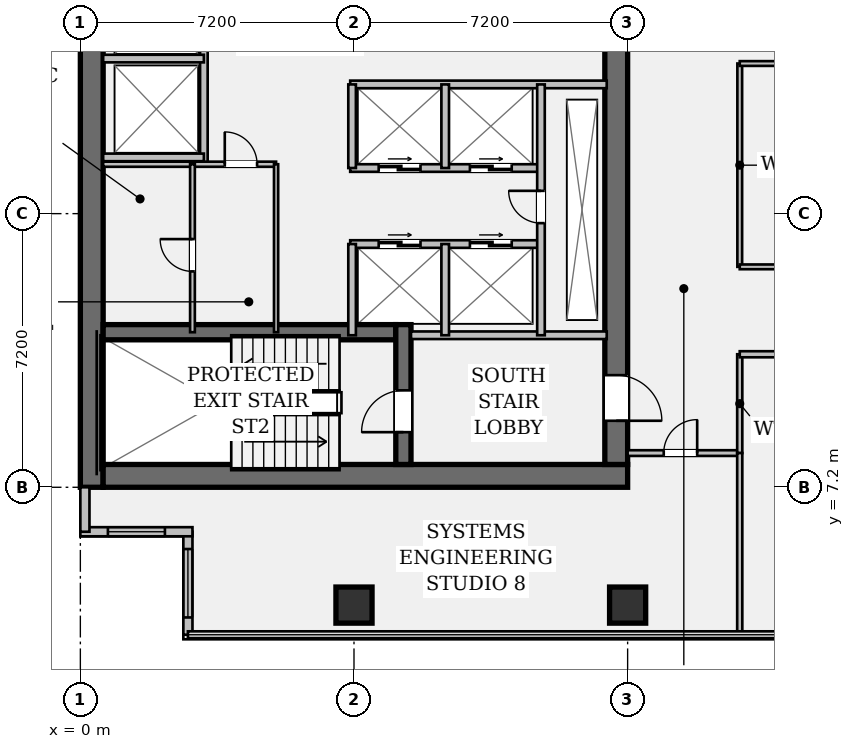
"""IFC4 building model, lengths in metres.
Left out: names, types, materials, properties, quantities, classifications, styles, units other than length and angle.
Written with IfcOpenShell. Run it as: python <this file> out.ifc"""

import sys

from ifc_helpers import new_model, si_unit, direction, frame, frame_2d, origin, origin_2d, place, context, subcontext, project, spatial, rectangle, hollow_rectangle, extrude, element, fill, save


model = new_model("IFC4")
c1 = context("Model", 3, precision=1e-05, world=origin(), true_north=direction((0.0, 1.0)))
c2 = subcontext(c1, "Body", "Model", "MODEL_VIEW")
j1 = project(units=[si_unit("LENGTHUNIT", "METRE"), si_unit("PLANEANGLEUNIT", "RADIAN")], contexts=[c1])
p1 = place(None, origin())
s1 = spatial("IfcSite", under=j1, at=p1, CompositionType="ELEMENT")
p2 = place(p1, origin())
s2 = spatial("IfcBuilding", under=s1, at=p2, CompositionType="ELEMENT")
p3 = place(p2, frame((0.0, 0.0, 106.05)))
s3 = spatial("IfcBuildingStorey", under=s2, at=p3, CompositionType="ELEMENT", Elevation=106.05)
p4 = place(p3, frame((0.3, 7.2, 0.0), z_axis=(0.0, 0.0, 1.0), x_axis=(0.0, 1.0, 0.0)))
e1 = element("IfcWall", 1, at=p4, inside=s3, PredefinedType="SHEAR", context=c2, shape_type="SweptSolid", body=[
    extrude(rectangle(XDim=28.8, YDim=0.6, at=frame_2d((14.4, 0.0))), origin(), (0.0, 0.0, 1.0), 3.58),
])
p5 = place(p3, frame((0.6, 7.5, 0.0), z_axis=(0.0, 0.0, 1.0), x_axis=(1.0, 0.0, 0.0)))
e2 = element("IfcWall", 2, at=p5, inside=s3, PredefinedType="SHEAR", context=c2, shape_type="SweptSolid", body=[
    extrude(rectangle(XDim=13.8, YDim=0.6, at=frame_2d((6.9, 0.0))), origin(), (0.0, 0.0, 1.0), 3.58),
])
p6 = place(p3, frame((14.1, 35.4, 0.0), z_axis=(0.0, 0.0, 1.0), x_axis=(0.0, -1.0, 0.0)))
e3 = element("IfcWall", 3, at=p6, inside=s3, PredefinedType="SHEAR", context=c2, shape_type="SweptSolid", body=[
    extrude(rectangle(XDim=27.6, YDim=0.6, at=frame_2d((13.8, 0.0))), origin(), (0.0, 0.0, 1.0), 3.58),
])
p7 = place(p6, frame((1.3, 0.0, 0.0)))
e4 = element("IfcOpeningElement", 4, at=p7, cuts=e3, PredefinedType="OPENING", context=c2, shape_type="SweptSolid", body=[
    extrude(rectangle(XDim=1.2, YDim=2.15, at=frame_2d((0.6, 1.075))), frame((0.0, 0.312, 0.0), z_axis=(0.0, -1.0, 0.0), x_axis=(1.0, 0.0, 0.0)), (0.0, 0.0, 1.0), 0.624),
])
p8 = place(p6, frame((25.25, 0.0, 0.0)))
e5 = element("IfcOpeningElement", 5, at=p8, cuts=e3, PredefinedType="OPENING", context=c2, shape_type="SweptSolid", body=[
    extrude(rectangle(XDim=1.2, YDim=2.15, at=frame_2d((0.6, 1.075))), frame((0.0, 0.312, 0.0), z_axis=(0.0, -1.0, 0.0), x_axis=(1.0, 0.0, 0.0)), (0.0, 0.0, 1.0), 0.624),
])
p9 = place(p6, frame((14.6, 0.0, 0.0)))
e6 = element("IfcOpeningElement", 6, at=p9, cuts=e3, PredefinedType="OPENING", context=c2, shape_type="SweptSolid", body=[
    extrude(rectangle(XDim=1.6, YDim=2.2, at=frame_2d((0.8, 1.1))), frame((0.0, 0.312, 0.0), z_axis=(0.0, -1.0, 0.0), x_axis=(1.0, 0.0, 0.0)), (0.0, 0.0, 1.0), 0.624),
])
p10 = place(p3, frame((0.6, 11.28, 0.0), z_axis=(0.0, 0.0, 1.0), x_axis=(1.0, 0.0, 0.0)))
e7 = element("IfcWall", 7, at=p10, inside=s3, PredefinedType="SHEAR", context=c2, shape_type="SweptSolid", body=[
    extrude(rectangle(XDim=7.7, YDim=0.4, at=frame_2d((3.85, 0.0))), origin(), (0.0, 0.0, 1.0), 3.58),
])
p11 = place(p3, frame((8.5, 7.8, 0.0), z_axis=(0.0, 0.0, 1.0), x_axis=(0.0, 1.0, 0.0)))
e8 = element("IfcWall", 8, at=p11, inside=s3, PredefinedType="SHEAR", context=c2, shape_type="SweptSolid", body=[
    extrude(rectangle(XDim=3.68, YDim=0.4, at=frame_2d((1.84, 0.0))), origin(), (0.0, 0.0, 1.0), 3.58),
])
p12 = place(p11, frame((0.85, 0.0, 0.0)))
e9 = element("IfcOpeningElement", 9, at=p12, cuts=e8, PredefinedType="OPENING", context=c2, shape_type="SweptSolid", body=[
    extrude(rectangle(XDim=1.1, YDim=2.15, at=frame_2d((0.55, 1.075))), frame((0.0, 0.212, 0.0), z_axis=(0.0, -1.0, 0.0), x_axis=(1.0, 0.0, 0.0)), (0.0, 0.0, 1.0), 0.424),
])
for number, where, z_axis, x_axis in (
    (10, (7.2, 4.1, 0.0), (0.0, 0.0, 1.0), (1.0, 0.0, 0.0)),
    (11, (14.4, 4.1, 0.0), (0.0, 0.0, 1.0), (1.0, 0.0, 0.0)),
):
    element("IfcColumn", number, at=place(p3, frame(where, z_axis=z_axis, x_axis=x_axis)), inside=s3, PredefinedType="COLUMN", context=c2, shape_type="SweptSolid", body=[
        extrude(hollow_rectangle(XDim=0.95, YDim=0.95, WallThickness=0.06, at=origin_2d()), origin(), (0.0, 0.0, 1.0), 3.58),
    ])
p13 = place(p3, frame((2.83, 3.32, 0.0), z_axis=(0.0, 0.0, 1.0), x_axis=(0.0, 1.0, 0.0)))
e12 = element("IfcWall", 12, at=p13, inside=s3, PredefinedType="STANDARD", context=c2, shape_type="SweptSolid", body=[
    extrude(rectangle(XDim=2.71, YDim=0.24, at=frame_2d((1.355, 0.0))), origin(), (0.0, 0.0, 1.0), 3.58),
])
p14 = place(p13, frame((0.455, 0.0, 0.95)))
e13 = element("IfcOpeningElement", 13, at=p14, cuts=e12, PredefinedType="OPENING", context=c2, shape_type="SweptSolid", body=[
    extrude(rectangle(XDim=1.8, YDim=1.35, at=frame_2d((0.9, 0.675))), frame((0.0, 0.132, 0.0), z_axis=(0.0, -1.0, 0.0), x_axis=(1.0, 0.0, 0.0)), (0.0, 0.0, 1.0), 0.264),
])
p15 = place(p3, frame((2.95, 6.03, 0.0), z_axis=(0.0, 0.0, 1.0), x_axis=(-1.0, 0.0, 0.0)))
e14 = element("IfcWall", 14, at=p15, inside=s3, PredefinedType="STANDARD", context=c2, shape_type="SweptSolid", body=[
    extrude(rectangle(XDim=2.95, YDim=0.24, at=frame_2d((1.475, 0.0))), origin(), (0.0, 0.0, 1.0), 3.58),
])
p16 = place(p15, frame((0.725, 0.0, 0.95)))
e15 = element("IfcOpeningElement", 15, at=p16, cuts=e14, PredefinedType="OPENING", context=c2, shape_type="SweptSolid", body=[
    extrude(rectangle(XDim=1.5, YDim=1.8, at=frame_2d((0.75, 0.9))), frame((0.0, 0.132, 0.0), z_axis=(0.0, -1.0, 0.0), x_axis=(1.0, 0.0, 0.0)), (0.0, 0.0, 1.0), 0.264),
])
p17 = place(p3, frame((0.12, 6.03, 0.0), z_axis=(0.0, 0.0, 1.0), x_axis=(0.0, 1.0, 0.0)))
e16 = element("IfcWall", 16, at=p17, inside=s3, PredefinedType="STANDARD", context=c2, shape_type="SweptSolid", body=[
    extrude(rectangle(XDim=1.17, YDim=0.24, at=frame_2d((0.585, 0.0))), origin(), (0.0, 0.0, 1.0), 3.58),
])
p18 = place(p3, frame((8.7, 11.2, 0.0), z_axis=(0.0, 0.0, 1.0), x_axis=(1.0, 0.0, 0.0)))
e17 = element("IfcWall", 17, at=p18, inside=s3, PredefinedType="PARTITIONING", context=c2, shape_type="SweptSolid", body=[
    extrude(rectangle(XDim=5.15, YDim=0.2, at=frame_2d((2.575, 0.0))), origin(), (0.0, 0.0, 1.0), 3.58),
])
p19 = place(p3, frame((3.25, 15.7, 0.0), z_axis=(0.0, 0.0, 1.0), x_axis=(0.0, 1.0, 0.0)))
e18 = element("IfcWall", 18, at=p19, inside=s3, PredefinedType="PARTITIONING", context=c2, shape_type="SweptSolid", body=[
    extrude(rectangle(XDim=13.08, YDim=0.2, at=frame_2d((6.54, 0.0))), origin(), (0.0, 0.0, 1.0), 3.58),
])
for number, where, z_axis, x_axis in (
    (19, (0.6, 15.88, 0.0), (0.0, 0.0, 1.0), (1.0, 0.0, 0.0)),
    (20, (0.6, 18.48, 0.0), (0.0, 0.0, 1.0), (1.0, 0.0, 0.0)),
):
    element("IfcWall", number, at=place(p3, frame(where, z_axis=z_axis, x_axis=x_axis)), inside=s3, PredefinedType="PARTITIONING", context=c2, shape_type="SweptSolid", body=[
        extrude(rectangle(XDim=2.65, YDim=0.2, at=frame_2d((1.325, 0.0))), origin(), (0.0, 0.0, 1.0), 3.58),
    ])
p20 = place(p3, frame((7.1, 17.8, 0.0), z_axis=(0.0, 0.0, 1.0), x_axis=(1.0, 0.0, 0.0)))
e21 = element("IfcWall", 21, at=p20, inside=s3, PredefinedType="PARTITIONING", context=c2, shape_type="SweptSolid", body=[
    extrude(rectangle(XDim=6.75, YDim=0.2, at=frame_2d((3.375, 0.0))), origin(), (0.0, 0.0, 1.0), 3.58),
])
p21 = place(p3, frame((7.1, 15.6, 0.0), z_axis=(0.0, 0.0, 1.0), x_axis=(1.0, 0.0, 0.0)))
e22 = element("IfcWall", 22, at=p21, inside=s3, PredefinedType="PARTITIONING", context=c2, shape_type="SweptSolid", body=[
    extrude(rectangle(XDim=5.02, YDim=0.2, at=frame_2d((2.51, 0.0))), origin(), (0.0, 0.0, 1.0), 3.58),
])
p22 = place(p21, frame((0.75, 0.0, 0.0)))
e23 = element("IfcOpeningElement", 23, at=p22, cuts=e22, PredefinedType="OPENING", context=c2, shape_type="SweptSolid", body=[
    extrude(rectangle(XDim=1.1, YDim=2.2, at=frame_2d((0.55, 1.1))), frame((0.0, 0.112, 0.0), z_axis=(0.0, -1.0, 0.0), x_axis=(1.0, 0.0, 0.0)), (0.0, 0.0, 1.0), 0.224),
])
p23 = place(p21, frame((3.15, 0.0, 0.0)))
e24 = element("IfcOpeningElement", 24, at=p23, cuts=e22, PredefinedType="OPENING", context=c2, shape_type="SweptSolid", body=[
    extrude(rectangle(XDim=1.1, YDim=2.2, at=frame_2d((0.55, 1.1))), frame((0.0, 0.112, 0.0), z_axis=(0.0, -1.0, 0.0), x_axis=(1.0, 0.0, 0.0)), (0.0, 0.0, 1.0), 0.224),
])
p24 = place(p3, frame((7.1, 13.6, 0.0), z_axis=(0.0, 0.0, 1.0), x_axis=(1.0, 0.0, 0.0)))
e25 = element("IfcWall", 25, at=p24, inside=s3, PredefinedType="PARTITIONING", context=c2, shape_type="SweptSolid", body=[
    extrude(rectangle(XDim=5.02, YDim=0.2, at=frame_2d((2.51, 0.0))), origin(), (0.0, 0.0, 1.0), 3.58),
])
p25 = place(p24, frame((0.75, 0.0, 0.0)))
e26 = element("IfcOpeningElement", 26, at=p25, cuts=e25, PredefinedType="OPENING", context=c2, shape_type="SweptSolid", body=[
    extrude(rectangle(XDim=1.1, YDim=2.2, at=frame_2d((0.55, 1.1))), frame((0.0, 0.112, 0.0), z_axis=(0.0, -1.0, 0.0), x_axis=(1.0, 0.0, 0.0)), (0.0, 0.0, 1.0), 0.224),
])
p26 = place(p24, frame((3.15, 0.0, 0.0)))
e27 = element("IfcOpeningElement", 27, at=p26, cuts=e25, PredefinedType="OPENING", context=c2, shape_type="SweptSolid", body=[
    extrude(rectangle(XDim=1.1, YDim=2.2, at=frame_2d((0.55, 1.1))), frame((0.0, 0.112, 0.0), z_axis=(0.0, -1.0, 0.0), x_axis=(1.0, 0.0, 0.0)), (0.0, 0.0, 1.0), 0.224),
])
p27 = place(p3, frame((7.15, 15.6, 0.0), z_axis=(0.0, 0.0, 1.0), x_axis=(0.0, 1.0, 0.0)))
e28 = element("IfcWall", 28, at=p27, inside=s3, PredefinedType="PARTITIONING", context=c2, shape_type="SweptSolid", body=[
    extrude(rectangle(XDim=2.2, YDim=0.2, at=frame_2d((1.1, 0.0))), origin(), (0.0, 0.0, 1.0), 3.58),
])
p28 = place(p3, frame((7.15, 11.2, 0.0), z_axis=(0.0, 0.0, 1.0), x_axis=(0.0, 1.0, 0.0)))
e29 = element("IfcWall", 29, at=p28, inside=s3, PredefinedType="PARTITIONING", context=c2, shape_type="SweptSolid", body=[
    extrude(rectangle(XDim=2.4, YDim=0.2, at=frame_2d((1.2, 0.0))), origin(), (0.0, 0.0, 1.0), 3.58),
])
p29 = place(p3, frame((9.6, 15.6, 0.0), z_axis=(0.0, 0.0, 1.0), x_axis=(0.0, 1.0, 0.0)))
e30 = element("IfcWall", 30, at=p29, inside=s3, PredefinedType="PARTITIONING", context=c2, shape_type="SweptSolid", body=[
    extrude(rectangle(XDim=2.2, YDim=0.2, at=frame_2d((1.1, 0.0))), origin(), (0.0, 0.0, 1.0), 3.58),
])
p30 = place(p3, frame((9.6, 11.2, 0.0), z_axis=(0.0, 0.0, 1.0), x_axis=(0.0, 1.0, 0.0)))
e31 = element("IfcWall", 31, at=p30, inside=s3, PredefinedType="PARTITIONING", context=c2, shape_type="SweptSolid", body=[
    extrude(rectangle(XDim=2.4, YDim=0.2, at=frame_2d((1.2, 0.0))), origin(), (0.0, 0.0, 1.0), 3.58),
])
p31 = place(p3, frame((12.12, 11.2, 0.0), z_axis=(0.0, 0.0, 1.0), x_axis=(0.0, 1.0, 0.0)))
e32 = element("IfcWall", 32, at=p31, inside=s3, PredefinedType="PARTITIONING", context=c2, shape_type="SweptSolid", body=[
    extrude(rectangle(XDim=6.6, YDim=0.2, at=frame_2d((3.3, 0.0))), origin(), (0.0, 0.0, 1.0), 3.58),
])
p32 = place(p31, frame((2.95, 0.0, 0.0)))
e33 = element("IfcOpeningElement", 33, at=p32, cuts=e32, PredefinedType="OPENING", context=c2, shape_type="SweptSolid", body=[
    extrude(rectangle(XDim=0.85, YDim=2.15, at=frame_2d((0.425, 1.075))), frame((0.0, 0.112, 0.0), z_axis=(0.0, -1.0, 0.0), x_axis=(1.0, 0.0, 0.0)), (0.0, 0.0, 1.0), 0.224),
])
p33 = place(p3, frame((0.6, 15.7, 0.0), z_axis=(0.0, 0.0, 1.0), x_axis=(1.0, 0.0, 0.0)))
e34 = element("IfcWall", 34, at=p33, inside=s3, PredefinedType="PARTITIONING", context=c2, shape_type="SweptSolid", body=[
    extrude(rectangle(XDim=4.55, YDim=0.135, at=frame_2d((2.275, 0.0))), origin(), (0.0, 0.0, 1.0), 3.58),
])
p34 = place(p33, frame((3.2, 0.0, 0.0)))
e35 = element("IfcOpeningElement", 35, at=p34, cuts=e34, PredefinedType="OPENING", context=c2, shape_type="SweptSolid", body=[
    extrude(rectangle(XDim=0.85, YDim=2.15, at=frame_2d((0.425, 1.075))), frame((0.0, 0.08, 0.0), z_axis=(0.0, -1.0, 0.0), x_axis=(1.0, 0.0, 0.0)), (0.0, 0.0, 1.0), 0.159),
])
p35 = place(p3, frame((5.15, 11.28, 0.0), z_axis=(0.0, 0.0, 1.0), x_axis=(0.0, 1.0, 0.0)))
e36 = element("IfcWall", 36, at=p35, inside=s3, PredefinedType="PARTITIONING", context=c2, shape_type="SweptSolid", body=[
    extrude(rectangle(XDim=4.42, YDim=0.11, at=frame_2d((2.21, 0.0))), origin(), (0.0, 0.0, 1.0), 3.58),
])
p36 = place(p3, frame((2.95, 11.28, 0.0), z_axis=(0.0, 0.0, 1.0), x_axis=(0.0, 1.0, 0.0)))
e37 = element("IfcWall", 37, at=p36, inside=s3, PredefinedType="PARTITIONING", context=c2, shape_type="SweptSolid", body=[
    extrude(rectangle(XDim=4.42, YDim=0.125, at=frame_2d((2.21, 0.0))), origin(), (0.0, 0.0, 1.0), 3.58),
])
p37 = place(p36, frame((1.6, 0.0, 0.0)))
e38 = element("IfcOpeningElement", 38, at=p37, cuts=e37, PredefinedType="OPENING", context=c2, shape_type="SweptSolid", body=[
    extrude(rectangle(XDim=0.85, YDim=2.15, at=frame_2d((0.425, 1.075))), frame((0.0, 0.074, 0.0), z_axis=(0.0, -1.0, 0.0), x_axis=(1.0, 0.0, 0.0)), (0.0, 0.0, 1.0), 0.149),
])
p38 = place(p3, frame((14.4, 8.1, 0.0), z_axis=(0.0, 0.0, 1.0), x_axis=(1.0, 0.0, 0.0)))
e39 = element("IfcWall", 39, at=p38, inside=s3, PredefinedType="PARTITIONING", context=c2, shape_type="SweptSolid", body=[
    extrude(rectangle(XDim=2.95, YDim=0.15, at=frame_2d((1.475, 0.0))), origin(), (0.0, 0.0, 1.0), 3.098),
])
p39 = place(p38, frame((0.95, 0.0, 0.0)))
e40 = element("IfcOpeningElement", 40, at=p39, cuts=e39, PredefinedType="OPENING", context=c2, shape_type="SweptSolid", body=[
    extrude(rectangle(XDim=0.88, YDim=2.15, at=frame_2d((0.44, 1.075))), frame((0.0, 0.087, 0.0), z_axis=(0.0, -1.0, 0.0), x_axis=(1.0, 0.0, 0.0)), (0.0, 0.0, 1.0), 0.174),
])
p40 = place(p3, frame((17.35, 8.1, 0.0), z_axis=(0.0, 0.0, 1.0), x_axis=(0.0, 1.0, 0.0)))
e41 = element("IfcWall", 41, at=p40, inside=s3, PredefinedType="PARTITIONING", context=c2, shape_type="SweptSolid", body=[
    extrude(rectangle(XDim=2.6, YDim=0.135, at=frame_2d((1.3, 0.0))), origin(), (0.0, 0.0, 1.0), 3.58),
])
p41 = place(p3, frame((17.35, 10.7, 0.0), z_axis=(0.0, 0.0, 1.0), x_axis=(1.0, 0.0, 0.0)))
e42 = element("IfcWall", 42, at=p41, inside=s3, PredefinedType="PARTITIONING", context=c2, shape_type="SweptSolid", body=[
    extrude(rectangle(XDim=17.55, YDim=0.16, at=frame_2d((8.775, 0.0))), origin(), (0.0, 0.0, 1.0), 2.793),
])
p42 = place(p41, frame((2.82, 0.0, 0.0)))
e43 = element("IfcOpeningElement", 43, at=p42, cuts=e42, PredefinedType="OPENING", context=c2, shape_type="SweptSolid", body=[
    extrude(rectangle(XDim=0.88, YDim=2.15, at=frame_2d((0.44, 1.075))), frame((0.0, 0.092, 0.0), z_axis=(0.0, -1.0, 0.0), x_axis=(1.0, 0.0, 0.0)), (0.0, 0.0, 1.0), 0.184),
])
p43 = place(p41, frame((9.45, 0.0, 0.0)))
e44 = element("IfcOpeningElement", 44, at=p43, cuts=e42, PredefinedType="OPENING", context=c2, shape_type="SweptSolid", body=[
    extrude(rectangle(XDim=0.88, YDim=2.15, at=frame_2d((0.44, 1.075))), frame((0.0, 0.092, 0.0), z_axis=(0.0, -1.0, 0.0), x_axis=(1.0, 0.0, 0.0)), (0.0, 0.0, 1.0), 0.184),
])
p44 = place(p41, frame((14.9, 0.0, 0.0)))
e45 = element("IfcOpeningElement", 45, at=p44, cuts=e42, PredefinedType="OPENING", context=c2, shape_type="SweptSolid", body=[
    extrude(rectangle(XDim=0.88, YDim=2.15, at=frame_2d((0.44, 1.075))), frame((0.0, 0.092, 0.0), z_axis=(0.0, -1.0, 0.0), x_axis=(1.0, 0.0, 0.0)), (0.0, 0.0, 1.0), 0.184),
])
p45 = place(p3, frame((17.35, 13.0, 0.0), z_axis=(0.0, 0.0, 1.0), x_axis=(0.0, 1.0, 0.0)))
e46 = element("IfcWall", 46, at=p45, inside=s3, PredefinedType="PARTITIONING", context=c2, shape_type="SweptSolid", body=[
    extrude(rectangle(XDim=5.35, YDim=0.125, at=frame_2d((2.675, 0.0))), origin(), (0.0, 0.0, 1.0), 2.793),
])
p46 = place(p3, frame((17.35, 13.0, 0.0), z_axis=(0.0, 0.0, 1.0), x_axis=(1.0, 0.0, 0.0)))
e47 = element("IfcWall", 47, at=p46, inside=s3, PredefinedType="PARTITIONING", context=c2, shape_type="SweptSolid", body=[
    extrude(rectangle(XDim=15.2, YDim=0.125, at=frame_2d((7.6, 0.0))), origin(), (0.0, 0.0, 1.0), 2.793),
])
p47 = place(p3, frame((17.35, 18.35, 0.0), z_axis=(0.0, 0.0, 1.0), x_axis=(1.0, 0.0, 0.0)))
e48 = element("IfcWall", 48, at=p47, inside=s3, PredefinedType="PARTITIONING", context=c2, shape_type="SweptSolid", body=[
    extrude(rectangle(XDim=15.2, YDim=0.125, at=frame_2d((7.6, 0.0))), origin(), (0.0, 0.0, 1.0), 2.793),
])
p48 = place(p47, frame((3.42, 0.0, 0.0)))
e49 = element("IfcOpeningElement", 49, at=p48, cuts=e48, PredefinedType="OPENING", context=c2, shape_type="SweptSolid", body=[
    extrude(rectangle(XDim=0.88, YDim=2.15, at=frame_2d((0.44, 1.075))), frame((0.0, 0.074, 0.0), z_axis=(0.0, -1.0, 0.0), x_axis=(1.0, 0.0, 0.0)), (0.0, 0.0, 1.0), 0.149),
])
p49 = place(p47, frame((11.02, 0.0, 0.0)))
e50 = element("IfcOpeningElement", 50, at=p49, cuts=e48, PredefinedType="OPENING", context=c2, shape_type="SweptSolid", body=[
    extrude(rectangle(XDim=0.88, YDim=2.15, at=frame_2d((0.44, 1.075))), frame((0.0, 0.074, 0.0), z_axis=(0.0, -1.0, 0.0), x_axis=(1.0, 0.0, 0.0)), (0.0, 0.0, 1.0), 0.149),
])
p50 = place(p3, frame((17.35, 3.32, 0.0), z_axis=(0.0, 0.0, 1.0), x_axis=(0.0, 1.0, 0.0)))
e51 = element("IfcWall", 51, at=p50, inside=s3, PredefinedType="PARTITIONING", context=c2, shape_type="SweptSolid", body=[
    extrude(rectangle(XDim=4.78, YDim=0.135, at=frame_2d((2.39, 0.0))), origin(), (0.0, 0.0, 1.0), 2.793),
])
p51 = place(p14, origin())
e52 = element("IfcWindow", 52, at=p51, inside=s3, PartitioningType="SINGLE_PANEL", PredefinedType="WINDOW", context=c2, shape_type="SweptSolid", body=[
    extrude(rectangle(XDim=1.8, YDim=1.35, at=frame_2d((0.9, 0.675))), frame((0.0, 0.03, 0.0), z_axis=(0.0, -1.0, 0.0), x_axis=(1.0, 0.0, 0.0)), (0.0, 0.0, 1.0), 0.06),
])
fill(e13, e52)
p52 = place(p16, origin())
e53 = element("IfcWindow", 53, at=p52, inside=s3, PartitioningType="SINGLE_PANEL", PredefinedType="WINDOW", context=c2, shape_type="SweptSolid", body=[
    extrude(rectangle(XDim=1.5, YDim=1.8, at=frame_2d((0.75, 0.9))), frame((0.0, 0.03, 0.0), z_axis=(0.0, -1.0, 0.0), x_axis=(1.0, 0.0, 0.0)), (0.0, 0.0, 1.0), 0.06),
])
fill(e15, e53)
p53 = place(p12, origin())
e54 = element("IfcDoor", 54, at=p53, inside=s3, OperationType="SINGLE_SWING_LEFT", PredefinedType="DOOR", context=c2, shape_type="SweptSolid", body=[
    extrude(rectangle(XDim=1.1, YDim=2.15, at=frame_2d((0.55, 1.075))), frame((0.0, 0.025, 0.0), z_axis=(0.0, -1.0, 0.0), x_axis=(1.0, 0.0, 0.0)), (0.0, 0.0, 1.0), 0.05),
])
fill(e9, e54)
p54 = place(p8, origin())
e55 = element("IfcDoor", 55, at=p54, inside=s3, OperationType="SINGLE_SWING_RIGHT", PredefinedType="DOOR", context=c2, shape_type="SweptSolid", body=[
    extrude(rectangle(XDim=1.2, YDim=2.15, at=frame_2d((0.6, 1.075))), frame((0.0, 0.025, 0.0), z_axis=(0.0, -1.0, 0.0), x_axis=(1.0, 0.0, 0.0)), (0.0, 0.0, 1.0), 0.05),
])
fill(e5, e55)
p55 = place(p32, origin())
e56 = element("IfcDoor", 56, at=p55, inside=s3, OperationType="SINGLE_SWING_RIGHT", PredefinedType="DOOR", context=c2, shape_type="SweptSolid", body=[
    extrude(rectangle(XDim=0.85, YDim=2.15, at=frame_2d((0.425, 1.075))), frame((0.0, 0.025, 0.0), z_axis=(0.0, -1.0, 0.0), x_axis=(1.0, 0.0, 0.0)), (0.0, 0.0, 1.0), 0.05),
])
fill(e33, e56)
p56 = place(p22, origin())
e57 = element("IfcDoor", 57, at=p56, inside=s3, OperationType="DOUBLE_DOOR_SLIDING", PredefinedType="DOOR", context=c2, shape_type="SweptSolid", body=[
    extrude(rectangle(XDim=1.1, YDim=2.2, at=frame_2d((0.55, 1.1))), frame((0.0, 0.025, 0.0), z_axis=(0.0, -1.0, 0.0), x_axis=(1.0, 0.0, 0.0)), (0.0, 0.0, 1.0), 0.05),
])
fill(e23, e57)
p57 = place(p23, origin())
e58 = element("IfcDoor", 58, at=p57, inside=s3, OperationType="DOUBLE_DOOR_SLIDING", PredefinedType="DOOR", context=c2, shape_type="SweptSolid", body=[
    extrude(rectangle(XDim=1.1, YDim=2.2, at=frame_2d((0.55, 1.1))), frame((0.0, 0.025, 0.0), z_axis=(0.0, -1.0, 0.0), x_axis=(1.0, 0.0, 0.0)), (0.0, 0.0, 1.0), 0.05),
])
fill(e24, e58)
p58 = place(p25, origin())
e59 = element("IfcDoor", 59, at=p58, inside=s3, OperationType="DOUBLE_DOOR_SLIDING", PredefinedType="DOOR", context=c2, shape_type="SweptSolid", body=[
    extrude(rectangle(XDim=1.1, YDim=2.2, at=frame_2d((0.55, 1.1))), frame((0.0, 0.025, 0.0), z_axis=(0.0, -1.0, 0.0), x_axis=(1.0, 0.0, 0.0)), (0.0, 0.0, 1.0), 0.05),
])
fill(e26, e59)
p59 = place(p26, origin())
e60 = element("IfcDoor", 60, at=p59, inside=s3, OperationType="DOUBLE_DOOR_SLIDING", PredefinedType="DOOR", context=c2, shape_type="SweptSolid", body=[
    extrude(rectangle(XDim=1.1, YDim=2.2, at=frame_2d((0.55, 1.1))), frame((0.0, 0.025, 0.0), z_axis=(0.0, -1.0, 0.0), x_axis=(1.0, 0.0, 0.0)), (0.0, 0.0, 1.0), 0.05),
])
fill(e27, e60)
p60 = place(p34, origin())
e61 = element("IfcDoor", 61, at=p60, inside=s3, OperationType="SINGLE_SWING_LEFT", PredefinedType="DOOR", context=c2, shape_type="SweptSolid", body=[
    extrude(rectangle(XDim=0.85, YDim=2.15, at=frame_2d((0.425, 1.075))), frame((0.0, 0.025, 0.0), z_axis=(0.0, -1.0, 0.0), x_axis=(1.0, 0.0, 0.0)), (0.0, 0.0, 1.0), 0.05),
])
fill(e35, e61)
p61 = place(p37, origin())
e62 = element("IfcDoor", 62, at=p61, inside=s3, OperationType="SINGLE_SWING_RIGHT", PredefinedType="DOOR", context=c2, shape_type="SweptSolid", body=[
    extrude(rectangle(XDim=0.85, YDim=2.15, at=frame_2d((0.425, 1.075))), frame((0.0, 0.025, 0.0), z_axis=(0.0, -1.0, 0.0), x_axis=(1.0, 0.0, 0.0)), (0.0, 0.0, 1.0), 0.05),
])
fill(e38, e62)
p62 = place(p39, origin())
e63 = element("IfcDoor", 63, at=p62, inside=s3, OperationType="SINGLE_SWING_RIGHT", PredefinedType="DOOR", context=c2, shape_type="SweptSolid", body=[
    extrude(rectangle(XDim=0.88, YDim=2.15, at=frame_2d((0.44, 1.075))), frame((0.0, 0.025, 0.0), z_axis=(0.0, -1.0, 0.0), x_axis=(1.0, 0.0, 0.0)), (0.0, 0.0, 1.0), 0.05),
])
fill(e40, e63)
save(model, sys.argv[1])
